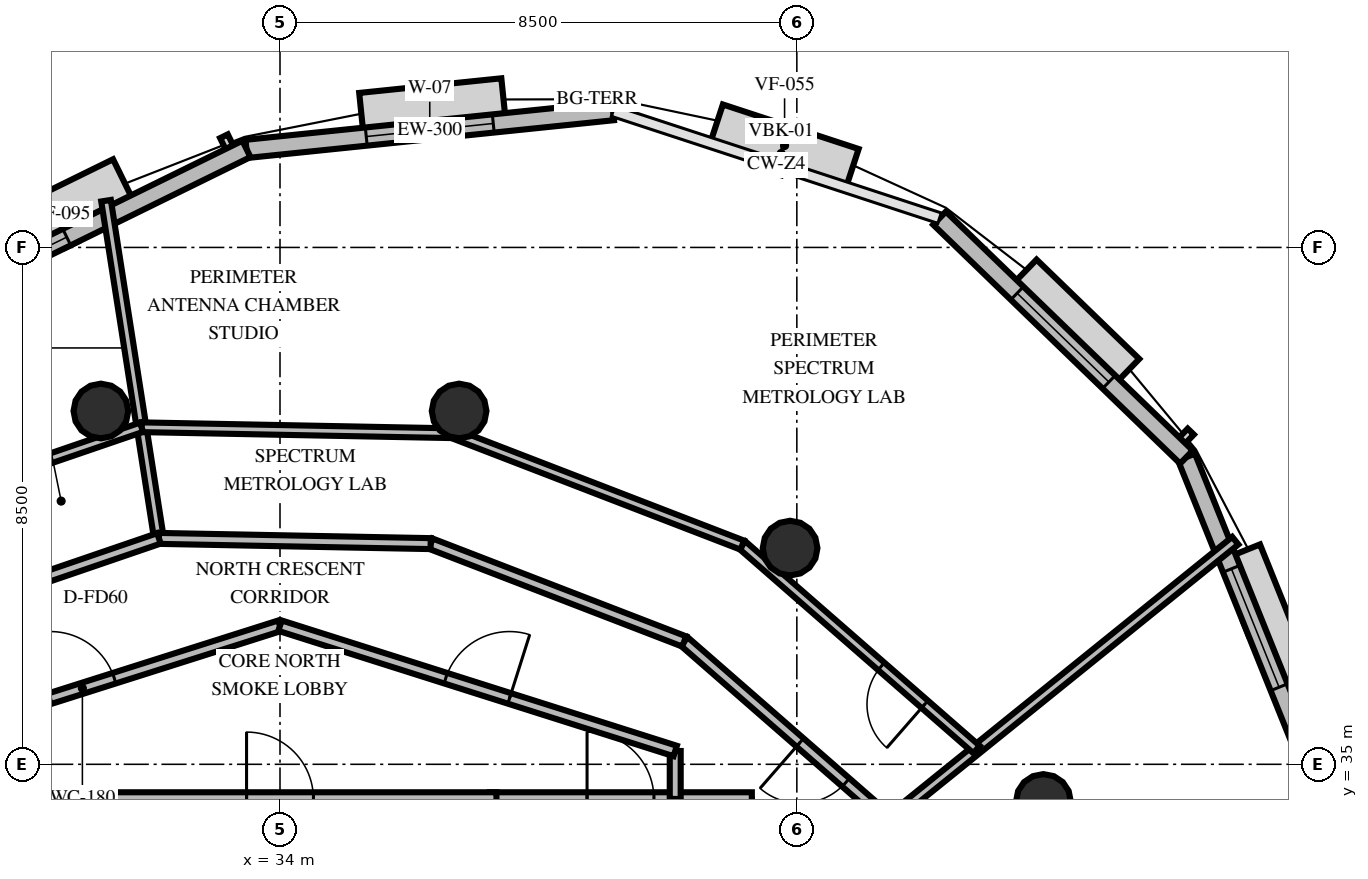
"""IFC4 building model, lengths in metres.
Left out: names, types, materials, properties, quantities, classifications, styles, units other than length and angle.
Written with IfcOpenShell. Run it as: python <this file> out.ifc"""

import sys

from ifc_helpers import new_model, si_unit, direction, frame, frame_2d, origin, origin_2d, place, context, subcontext, project, spatial, rectangle, circle, extrude, element, fill, save


model = new_model("IFC4")
c1 = context("Model", 3, precision=1e-05, world=origin(), true_north=direction((0.0, 1.0)))
c2 = subcontext(c1, "Body", "Model", "MODEL_VIEW")
j1 = project(units=[si_unit("LENGTHUNIT", "METRE"), si_unit("PLANEANGLEUNIT", "RADIAN")], contexts=[c1])
p1 = place(None, origin())
s1 = spatial("IfcSite", under=j1, at=p1, CompositionType="ELEMENT")
p2 = place(p1, origin())
s2 = spatial("IfcBuilding", under=s1, at=p2, CompositionType="ELEMENT")
p3 = place(p2, frame((0.0, 0.0, 273.6)))
s3 = spatial("IfcBuildingStorey", under=s2, at=p3, CompositionType="ELEMENT", Elevation=273.6)
for number, where, z_axis, x_axis in (
    (1, (46.555, 34.389, 0.0), (0.0, 0.0, 1.0), (1.0, 0.0, 0.0)),
    (2, (42.389, 38.555, 0.0), (0.0, 0.0, 1.0), (1.0, 0.0, 0.0)),
    (3, (36.946, 40.81, 0.0), (0.0, 0.0, 1.0), (1.0, 0.0, 0.0)),
    (4, (31.054, 40.81, 0.0), (0.0, 0.0, 1.0), (1.0, 0.0, 0.0)),
):
    element("IfcColumn", number, at=place(p3, frame(where, z_axis=z_axis, x_axis=x_axis)), inside=s3, PredefinedType="COLUMN", context=c2, shape_type="SweptSolid", body=[
        extrude(circle(Radius=0.45, at=origin_2d()), origin(), (0.0, 0.0, 1.0), 3.6),
    ])
p4 = place(p3, frame((39.478, 45.741, 0.0), z_axis=(0.0, 0.0, 1.0), x_axis=(-0.994737324556, -0.102458065252, 0.0)))
e5 = element("IfcWall", 5, at=p4, inside=s3, PredefinedType="SOLIDWALL", context=c2, shape_type="SweptSolid", body=[
    extrude(rectangle(XDim=6.062, YDim=0.3, at=frame_2d((3.031, 0.0))), origin(), (0.0, 0.0, 1.0), 2.76),
])
p5 = place(p4, frame((1.981, 0.0, 0.8)))
e6 = element("IfcOpeningElement", 6, at=p5, cuts=e5, PredefinedType="OPENING", context=c2, shape_type="SweptSolid", body=[
    extrude(rectangle(XDim=2.1, YDim=1.85, at=frame_2d((1.05, 0.925))), frame((0.0, 0.16, 0.0), z_axis=(0.0, -1.0, 0.0), x_axis=(1.0, 0.0, 0.0)), (0.0, 0.0, 1.0), 0.32),
])
p6 = place(p3, frame((33.448, 45.12, 0.0), z_axis=(0.0, 0.0, 1.0), x_axis=(-0.897666817596, -0.440674805936, 0.0)))
e7 = element("IfcWall", 7, at=p6, inside=s3, PredefinedType="SOLIDWALL", context=c2, shape_type="SweptSolid", body=[
    extrude(rectangle(XDim=6.643, YDim=0.3, at=frame_2d((3.322, 0.0))), origin(), (0.0, 0.0, 1.0), 2.76),
])
p7 = place(p6, frame((3.292, 0.0, 0.8)))
e8 = element("IfcOpeningElement", 8, at=p7, cuts=e7, PredefinedType="OPENING", context=c2, shape_type="SweptSolid", body=[
    extrude(rectangle(XDim=2.1, YDim=1.85, at=frame_2d((1.05, 0.925))), frame((0.0, 0.16, 0.0), z_axis=(0.0, -1.0, 0.0), x_axis=(1.0, 0.0, 0.0)), (0.0, 0.0, 1.0), 0.32),
])
p8 = place(p3, frame((51.171, 34.429, 0.0), z_axis=(0.0, 0.0, 1.0), x_axis=(-0.373264770135, 0.927724857582, 0.0)))
e9 = element("IfcWall", 9, at=p8, inside=s3, PredefinedType="SOLIDWALL", context=c2, shape_type="SweptSolid", body=[
    extrude(rectangle(XDim=6.062, YDim=0.3, at=frame_2d((3.031, 0.0))), origin(), (0.0, 0.0, 1.0), 2.76),
])
p9 = place(p8, frame((1.981, 0.0, 0.8)))
e10 = element("IfcOpeningElement", 10, at=p9, cuts=e9, PredefinedType="OPENING", context=c2, shape_type="SweptSolid", body=[
    extrude(rectangle(XDim=2.1, YDim=1.85, at=frame_2d((1.05, 0.925))), frame((0.0, 0.16, 0.0), z_axis=(0.0, -1.0, 0.0), x_axis=(1.0, 0.0, 0.0)), (0.0, 0.0, 1.0), 0.32),
])
p10 = place(p3, frame((48.908, 40.053, 0.0), z_axis=(0.0, 0.0, 1.0), x_axis=(-0.71871914798, 0.695300500739, 0.0)))
e11 = element("IfcWall", 11, at=p10, inside=s3, PredefinedType="SOLIDWALL", context=c2, shape_type="SweptSolid", body=[
    extrude(rectangle(XDim=5.65, YDim=0.3, at=frame_2d((2.825, 0.0))), origin(), (0.0, 0.0, 1.0), 2.76),
])
p11 = place(p10, frame((1.775, 0.0, 0.8)))
e12 = element("IfcOpeningElement", 12, at=p11, cuts=e11, PredefinedType="OPENING", context=c2, shape_type="SweptSolid", body=[
    extrude(rectangle(XDim=2.1, YDim=1.85, at=frame_2d((1.05, 0.925))), frame((0.0, 0.16, 0.0), z_axis=(0.0, -1.0, 0.0), x_axis=(1.0, 0.0, 0.0)), (0.0, 0.0, 1.0), 0.32),
])
p12 = place(p3, frame((30.44, 30.05, 0.0), z_axis=(0.0, 0.0, 1.0), x_axis=(0.0, 1.0, 0.0)))
e13 = element("IfcWall", 13, at=p12, inside=s3, PredefinedType="SOLIDWALL", context=c2, shape_type="SweptSolid", body=[
    extrude(rectangle(XDim=4.38, YDim=0.22, at=frame_2d((2.19, 0.0))), origin(), (0.0, 0.0, 1.0), 2.46),
])
p13 = place(p12, frame((0.8, 0.0, 0.0)))
e14 = element("IfcOpeningElement", 14, at=p13, cuts=e13, PredefinedType="OPENING", context=c2, shape_type="SweptSolid", body=[
    extrude(rectangle(XDim=1.05, YDim=2.1, at=frame_2d((0.525, 1.05))), frame((0.0, 0.12, 0.0), z_axis=(0.0, -1.0, 0.0), x_axis=(1.0, 0.0, 0.0)), (0.0, 0.0, 1.0), 0.24),
])
p14 = place(p3, frame((26.24, 34.43, 0.0), z_axis=(0.0, 0.0, 1.0), x_axis=(1.0, 0.0, 0.0)))
e15 = element("IfcWall", 15, at=p14, inside=s3, PredefinedType="SOLIDWALL", context=c2, shape_type="SweptSolid", body=[
    extrude(rectangle(XDim=4.31, YDim=0.22, at=frame_2d((2.155, 0.0))), origin(), (0.0, 0.0, 1.0), 2.46),
])
p15 = place(p14, frame((1.6, 0.0, 0.0)))
e16 = element("IfcOpeningElement", 16, at=p15, cuts=e15, PredefinedType="OPENING", context=c2, shape_type="SweptSolid", body=[
    extrude(rectangle(XDim=1.1, YDim=2.15, at=frame_2d((0.55, 1.075))), frame((0.0, 0.12, 0.0), z_axis=(0.0, -1.0, 0.0), x_axis=(1.0, 0.0, 0.0)), (0.0, 0.0, 1.0), 0.24),
])
p16 = place(p3, frame((32.85, 30.05, 0.0), z_axis=(0.0, 0.0, 1.0), x_axis=(0.0, 1.0, 0.0)))
e17 = element("IfcWall", 17, at=p16, inside=s3, PredefinedType="SOLIDWALL", context=c2, shape_type="SweptSolid", body=[
    extrude(rectangle(XDim=4.38, YDim=0.2, at=frame_2d((2.19, 0.0))), origin(), (0.0, 0.0, 1.0), 2.46),
])
p17 = place(p16, frame((2.65, 0.0, 0.0)))
e18 = element("IfcOpeningElement", 18, at=p17, cuts=e17, PredefinedType="OPENING", context=c2, shape_type="SweptSolid", body=[
    extrude(rectangle(XDim=0.86, YDim=2.05, at=frame_2d((0.43, 1.025))), frame((0.0, 0.11, 0.0), z_axis=(0.0, -1.0, 0.0), x_axis=(1.0, 0.0, 0.0)), (0.0, 0.0, 1.0), 0.22),
])
p18 = place(p3, frame((37.56, 30.05, 0.0), z_axis=(0.0, 0.0, 1.0), x_axis=(0.0, 1.0, 0.0)))
e19 = element("IfcWall", 19, at=p18, inside=s3, PredefinedType="SOLIDWALL", context=c2, shape_type="SweptSolid", body=[
    extrude(rectangle(XDim=4.38, YDim=0.22, at=frame_2d((2.19, 0.0))), origin(), (0.0, 0.0, 1.0), 2.46),
])
p19 = place(p18, frame((0.8, 0.0, 0.0)))
e20 = element("IfcOpeningElement", 20, at=p19, cuts=e19, PredefinedType="OPENING", context=c2, shape_type="SweptSolid", body=[
    extrude(rectangle(XDim=1.05, YDim=2.1, at=frame_2d((0.525, 1.05))), frame((0.0, 0.12, 0.0), z_axis=(0.0, -1.0, 0.0), x_axis=(1.0, 0.0, 0.0)), (0.0, 0.0, 1.0), 0.24),
])
p20 = place(p3, frame((41.65, 30.05, 0.0), z_axis=(0.0, 0.0, 1.0), x_axis=(0.0, 1.0, 0.0)))
e21 = element("IfcWall", 21, at=p20, inside=s3, PredefinedType="SOLIDWALL", context=c2, shape_type="SweptSolid", body=[
    extrude(rectangle(XDim=4.38, YDim=0.22, at=frame_2d((2.19, 0.0))), origin(), (0.0, 0.0, 1.0), 2.46),
])
p21 = place(p3, frame((37.45, 34.43, 0.0), z_axis=(0.0, 0.0, 1.0), x_axis=(1.0, 0.0, 0.0)))
e22 = element("IfcWall", 22, at=p21, inside=s3, PredefinedType="SOLIDWALL", context=c2, shape_type="SweptSolid", body=[
    extrude(rectangle(XDim=4.31, YDim=0.22, at=frame_2d((2.155, 0.0))), origin(), (0.0, 0.0, 1.0), 2.46),
])
p22 = place(p21, frame((1.6, 0.0, 0.0)))
e23 = element("IfcOpeningElement", 23, at=p22, cuts=e22, PredefinedType="OPENING", context=c2, shape_type="SweptSolid", body=[
    extrude(rectangle(XDim=1.1, YDim=2.15, at=frame_2d((0.55, 1.075))), frame((0.0, 0.12, 0.0), z_axis=(0.0, -1.0, 0.0), x_axis=(1.0, 0.0, 0.0)), (0.0, 0.0, 1.0), 0.24),
])
p23 = place(p3, frame((35.15, 30.05, 0.0), z_axis=(0.0, 0.0, 1.0), x_axis=(0.0, 1.0, 0.0)))
e24 = element("IfcWall", 24, at=p23, inside=s3, PredefinedType="SOLIDWALL", context=c2, shape_type="SweptSolid", body=[
    extrude(rectangle(XDim=4.38, YDim=0.2, at=frame_2d((2.19, 0.0))), origin(), (0.0, 0.0, 1.0), 2.46),
])
p24 = place(p23, frame((2.65, 0.0, 0.0)))
e25 = element("IfcOpeningElement", 25, at=p24, cuts=e24, PredefinedType="OPENING", context=c2, shape_type="SweptSolid", body=[
    extrude(rectangle(XDim=0.86, YDim=2.05, at=frame_2d((0.43, 1.025))), frame((0.0, 0.11, 0.0), z_axis=(0.0, -1.0, 0.0), x_axis=(1.0, 0.0, 0.0)), (0.0, 0.0, 1.0), 0.22),
])
p25 = place(p3, frame((30.44, 34.43, 0.0), z_axis=(0.0, 0.0, 1.0), x_axis=(1.0, 0.0, 0.0)))
e26 = element("IfcWall", 26, at=p25, inside=s3, PredefinedType="SOLIDWALL", context=c2, shape_type="SweptSolid", body=[
    extrude(rectangle(XDim=7.12, YDim=0.22, at=frame_2d((3.56, 0.0))), origin(), (0.0, 0.0, 1.0), 2.46),
])
p26 = place(p25, frame((3.01, 0.0, 0.0)))
e27 = element("IfcOpeningElement", 27, at=p26, cuts=e26, PredefinedType="OPENING", context=c2, shape_type="SweptSolid", body=[
    extrude(rectangle(XDim=1.1, YDim=2.15, at=frame_2d((0.55, 1.075))), frame((0.0, 0.12, 0.0), z_axis=(0.0, -1.0, 0.0), x_axis=(1.0, 0.0, 0.0)), (0.0, 0.0, 1.0), 0.24),
])
p27 = place(p3, frame((40.5, 35.219, 0.0), z_axis=(0.0, 0.0, 1.0), x_axis=(0.0, -1.0, 0.0)))
e28 = element("IfcWall", 28, at=p27, inside=s3, PredefinedType="PARTITIONING", context=c2, shape_type="SweptSolid", body=[
    extrude(rectangle(XDim=0.789, YDim=0.18, at=frame_2d((0.395, 0.0))), origin(), (0.0, 0.0, 1.0), 2.46),
])
p28 = place(p3, frame((27.5, 35.219, 0.0), z_axis=(0.0, 0.0, 1.0), x_axis=(0.953228121756, 0.302251795518, 0.0)))
e29 = element("IfcWall", 29, at=p28, inside=s3, PredefinedType="PARTITIONING", context=c2, shape_type="SweptSolid", body=[
    extrude(rectangle(XDim=6.819, YDim=0.18, at=frame_2d((3.409, 0.0))), origin(), (0.0, 0.0, 1.0), 2.46),
])
p29 = place(p28, frame((2.86, 0.0, 0.0)))
e30 = element("IfcOpeningElement", 30, at=p29, cuts=e29, PredefinedType="OPENING", context=c2, shape_type="SweptSolid", body=[
    extrude(rectangle(XDim=1.1, YDim=2.15, at=frame_2d((0.55, 1.075))), frame((0.0, 0.1, 0.0), z_axis=(0.0, -1.0, 0.0), x_axis=(1.0, 0.0, 0.0)), (0.0, 0.0, 1.0), 0.2),
])
p30 = place(p3, frame((34.0, 37.28, 0.0), z_axis=(0.0, 0.0, 1.0), x_axis=(0.953228121756, -0.302251795518, 0.0)))
e31 = element("IfcWall", 31, at=p30, inside=s3, PredefinedType="PARTITIONING", context=c2, shape_type="SweptSolid", body=[
    extrude(rectangle(XDim=6.819, YDim=0.18, at=frame_2d((3.409, 0.0))), origin(), (0.0, 0.0, 1.0), 2.46),
])
p31 = place(p30, frame((2.86, 0.0, 0.0)))
e32 = element("IfcOpeningElement", 32, at=p31, cuts=e31, PredefinedType="OPENING", context=c2, shape_type="SweptSolid", body=[
    extrude(rectangle(XDim=1.1, YDim=2.15, at=frame_2d((0.55, 1.075))), frame((0.0, 0.1, 0.0), z_axis=(0.0, -1.0, 0.0), x_axis=(1.0, 0.0, 0.0)), (0.0, 0.0, 1.0), 0.2),
])
p32 = place(p3, frame((44.016, 34.082, 0.0), z_axis=(0.0, 0.0, 1.0), x_axis=(0.778218955655, 0.627993039021, 0.0)))
e33 = element("IfcWall", 33, at=p32, inside=s3, PredefinedType="PARTITIONING", context=c2, shape_type="SweptSolid", body=[
    extrude(rectangle(XDim=7.318, YDim=0.16, at=frame_2d((3.659, 0.0))), origin(), (0.0, 0.0, 1.0), 2.46),
])
p33 = place(p3, frame((32.009, 38.715, 0.0), z_axis=(0.0, 0.0, 1.0), x_axis=(-0.154706776943, 0.987960430973, 0.0)))
e34 = element("IfcWall", 34, at=p33, inside=s3, PredefinedType="PARTITIONING", context=c2, shape_type="SweptSolid", body=[
    extrude(rectangle(XDim=5.621, YDim=0.16, at=frame_2d((2.811, 0.0))), origin(), (0.0, 0.0, 1.0), 2.46),
])
p34 = place(p3, frame((44.016, 34.082, 0.0), z_axis=(0.0, 0.0, 1.0), x_axis=(-0.753560422162, 0.657378650514, 0.0)))
e35 = element("IfcWall", 35, at=p34, inside=s3, PredefinedType="PARTITIONING", context=c2, shape_type="SweptSolid", body=[
    extrude(rectangle(XDim=4.47, YDim=0.18, at=frame_2d((2.235, 0.0))), origin(), (0.0, 0.0, 1.0), 2.46),
])
p35 = place(p34, frame((0.942, 0.0, 0.0)))
e36 = element("IfcOpeningElement", 36, at=p35, cuts=e35, PredefinedType="OPENING", context=c2, shape_type="SweptSolid", body=[
    extrude(rectangle(XDim=1.0, YDim=2.15, at=frame_2d((0.5, 1.075))), frame((0.0, 0.1, 0.0), z_axis=(0.0, -1.0, 0.0), x_axis=(1.0, 0.0, 0.0)), (0.0, 0.0, 1.0), 0.2),
])
p36 = place(p3, frame((40.648, 37.02, 0.0), z_axis=(0.0, 0.0, 1.0), x_axis=(-0.932964972783, 0.359967164557, 0.0)))
e37 = element("IfcWall", 37, at=p36, inside=s3, PredefinedType="PARTITIONING", context=c2, shape_type="SweptSolid", body=[
    extrude(rectangle(XDim=4.469, YDim=0.18, at=frame_2d((2.235, 0.0))), origin(), (0.0, 0.0, 1.0), 2.46),
])
p37 = place(p3, frame((36.478, 38.629, 0.0), z_axis=(0.0, 0.0, 1.0), x_axis=(-0.999815160221, 0.019226164239, 0.0)))
e38 = element("IfcWall", 38, at=p37, inside=s3, PredefinedType="PARTITIONING", context=c2, shape_type="SweptSolid", body=[
    extrude(rectangle(XDim=4.47, YDim=0.18, at=frame_2d((2.235, 0.0))), origin(), (0.0, 0.0, 1.0), 2.46),
])
p38 = place(p3, frame((45.456, 35.244, 0.0), z_axis=(0.0, 0.0, 1.0), x_axis=(-0.753561003445, 0.657377984182, 0.0)))
e39 = element("IfcWall", 39, at=p38, inside=s3, PredefinedType="PARTITIONING", context=c2, shape_type="SweptSolid", body=[
    extrude(rectangle(XDim=5.112, YDim=0.16, at=frame_2d((2.556, 0.0))), origin(), (0.0, 0.0, 1.0), 2.46),
])
p39 = place(p38, frame((1.131, 0.0, 0.0)))
e40 = element("IfcOpeningElement", 40, at=p39, cuts=e39, PredefinedType="OPENING", context=c2, shape_type="SweptSolid", body=[
    extrude(rectangle(XDim=0.95, YDim=2.15, at=frame_2d((0.475, 1.075))), frame((0.0, 0.09, 0.0), z_axis=(0.0, -1.0, 0.0), x_axis=(1.0, 0.0, 0.0)), (0.0, 0.0, 1.0), 0.18),
])
for number, where, z_axis, x_axis in (
    (41, (41.604, 38.604, 0.0), (0.0, 0.0, 1.0), (-0.933, 0.36, 0.0)),
    (42, (36.834, 40.445, 0.0), (0.0, 0.0, 1.0), (-1.0, 0.019, 0.0)),
):
    element("IfcWall", number, at=place(p3, frame(where, z_axis=z_axis, x_axis=x_axis)), inside=s3, PredefinedType="PARTITIONING", context=c2, shape_type="SweptSolid", body=[
        extrude(rectangle(XDim=5.112, YDim=0.16, at=frame_2d((2.556, 0.0))), origin(), (0.0, 0.0, 1.0), 2.46),
    ])
p40 = place(p3, frame((32.009, 38.715, 0.0), z_axis=(0.0, 0.0, 1.0), x_axis=(-0.946067972385, -0.323968195394, 0.0)))
e43 = element("IfcWall", 43, at=p40, inside=s3, PredefinedType="PARTITIONING", context=c2, shape_type="SweptSolid", body=[
    extrude(rectangle(XDim=4.469, YDim=0.18, at=frame_2d((2.235, 0.0))), origin(), (0.0, 0.0, 1.0), 2.46),
])
p41 = place(p40, frame((2.527, 0.0, 0.0)))
e44 = element("IfcOpeningElement", 44, at=p41, cuts=e43, PredefinedType="OPENING", context=c2, shape_type="SweptSolid", body=[
    extrude(rectangle(XDim=1.0, YDim=2.15, at=frame_2d((0.5, 1.075))), frame((0.0, 0.1, 0.0), z_axis=(0.0, -1.0, 0.0), x_axis=(1.0, 0.0, 0.0)), (0.0, 0.0, 1.0), 0.2),
])
p42 = place(p3, frame((31.723, 40.543, 0.0), z_axis=(0.0, 0.0, 1.0), x_axis=(-0.946082744304, -0.323925054496, 0.0)))
e45 = element("IfcWall", 45, at=p42, inside=s3, PredefinedType="PARTITIONING", context=c2, shape_type="SweptSolid", body=[
    extrude(rectangle(XDim=5.112, YDim=0.16, at=frame_2d((2.556, 0.0))), origin(), (0.0, 0.0, 1.0), 2.46),
])
p43 = place(p42, frame((3.032, 0.0, 0.0)))
e46 = element("IfcOpeningElement", 46, at=p43, cuts=e45, PredefinedType="OPENING", context=c2, shape_type="SweptSolid", body=[
    extrude(rectangle(XDim=0.95, YDim=2.15, at=frame_2d((0.475, 1.075))), frame((0.0, 0.09, 0.0), z_axis=(0.0, -1.0, 0.0), x_axis=(1.0, 0.0, 0.0)), (0.0, 0.0, 1.0), 0.18),
])
p44 = place(p5, origin())
e47 = element("IfcWindow", 47, at=p44, inside=s3, PartitioningType="SINGLE_PANEL", PredefinedType="WINDOW", context=c2, shape_type="SweptSolid", body=[
    extrude(rectangle(XDim=2.1, YDim=1.85, at=frame_2d((1.05, 0.925))), frame((0.0, 0.03, 0.0), z_axis=(0.0, -1.0, 0.0), x_axis=(1.0, 0.0, 0.0)), (0.0, 0.0, 1.0), 0.06),
])
fill(e6, e47)
p45 = place(p7, origin())
e48 = element("IfcWindow", 48, at=p45, inside=s3, PartitioningType="SINGLE_PANEL", PredefinedType="WINDOW", context=c2, shape_type="SweptSolid", body=[
    extrude(rectangle(XDim=2.1, YDim=1.85, at=frame_2d((1.05, 0.925))), frame((0.0, 0.03, 0.0), z_axis=(0.0, -1.0, 0.0), x_axis=(1.0, 0.0, 0.0)), (0.0, 0.0, 1.0), 0.06),
])
fill(e8, e48)
p46 = place(p9, origin())
e49 = element("IfcWindow", 49, at=p46, inside=s3, PartitioningType="SINGLE_PANEL", PredefinedType="WINDOW", context=c2, shape_type="SweptSolid", body=[
    extrude(rectangle(XDim=2.1, YDim=1.85, at=frame_2d((1.05, 0.925))), frame((0.0, 0.03, 0.0), z_axis=(0.0, -1.0, 0.0), x_axis=(1.0, 0.0, 0.0)), (0.0, 0.0, 1.0), 0.06),
])
fill(e10, e49)
p47 = place(p11, origin())
e50 = element("IfcWindow", 50, at=p47, inside=s3, PartitioningType="SINGLE_PANEL", PredefinedType="WINDOW", context=c2, shape_type="SweptSolid", body=[
    extrude(rectangle(XDim=2.1, YDim=1.85, at=frame_2d((1.05, 0.925))), frame((0.0, 0.03, 0.0), z_axis=(0.0, -1.0, 0.0), x_axis=(1.0, 0.0, 0.0)), (0.0, 0.0, 1.0), 0.06),
])
fill(e12, e50)
p48 = place(p22, origin())
e51 = element("IfcDoor", 51, at=p48, inside=s3, OperationType="SINGLE_SWING_LEFT", PredefinedType="DOOR", context=c2, shape_type="SweptSolid", body=[
    extrude(rectangle(XDim=1.1, YDim=2.15, at=frame_2d((0.55, 1.075))), frame((0.0, 0.025, 0.0), z_axis=(0.0, -1.0, 0.0), x_axis=(1.0, 0.0, 0.0)), (0.0, 0.0, 1.0), 0.05),
])
fill(e23, e51)
p49 = place(p26, origin())
e52 = element("IfcDoor", 52, at=p49, inside=s3, OperationType="SINGLE_SWING_LEFT", PredefinedType="DOOR", context=c2, shape_type="SweptSolid", body=[
    extrude(rectangle(XDim=1.1, YDim=2.15, at=frame_2d((0.55, 1.075))), frame((0.0, 0.025, 0.0), z_axis=(0.0, -1.0, 0.0), x_axis=(1.0, 0.0, 0.0)), (0.0, 0.0, 1.0), 0.05),
])
fill(e27, e52)
p50 = place(p29, origin())
e53 = element("IfcDoor", 53, at=p50, inside=s3, OperationType="SINGLE_SWING_LEFT", PredefinedType="DOOR", context=c2, shape_type="SweptSolid", body=[
    extrude(rectangle(XDim=1.1, YDim=2.15, at=frame_2d((0.55, 1.075))), frame((0.0, 0.025, 0.0), z_axis=(0.0, -1.0, 0.0), x_axis=(1.0, 0.0, 0.0)), (0.0, 0.0, 1.0), 0.05),
])
fill(e30, e53)
p51 = place(p31, origin())
e54 = element("IfcDoor", 54, at=p51, inside=s3, OperationType="SINGLE_SWING_RIGHT", PredefinedType="DOOR", context=c2, shape_type="SweptSolid", body=[
    extrude(rectangle(XDim=1.1, YDim=2.15, at=frame_2d((0.55, 1.075))), frame((0.0, 0.025, 0.0), z_axis=(0.0, -1.0, 0.0), x_axis=(1.0, 0.0, 0.0)), (0.0, 0.0, 1.0), 0.05),
])
fill(e32, e54)
p52 = place(p35, origin())
e55 = element("IfcDoor", 55, at=p52, inside=s3, OperationType="SINGLE_SWING_RIGHT", PredefinedType="DOOR", context=c2, shape_type="SweptSolid", body=[
    extrude(rectangle(XDim=1.0, YDim=2.15, at=frame_2d((0.5, 1.075))), frame((0.0, 0.025, 0.0), z_axis=(0.0, -1.0, 0.0), x_axis=(1.0, 0.0, 0.0)), (0.0, 0.0, 1.0), 0.05),
])
fill(e36, e55)
p53 = place(p39, origin())
e56 = element("IfcDoor", 56, at=p53, inside=s3, OperationType="SINGLE_SWING_LEFT", PredefinedType="DOOR", context=c2, shape_type="SweptSolid", body=[
    extrude(rectangle(XDim=0.95, YDim=2.15, at=frame_2d((0.475, 1.075))), frame((0.0, 0.025, 0.0), z_axis=(0.0, -1.0, 0.0), x_axis=(1.0, 0.0, 0.0)), (0.0, 0.0, 1.0), 0.05),
])
fill(e40, e56)
save(model, sys.argv[1])
